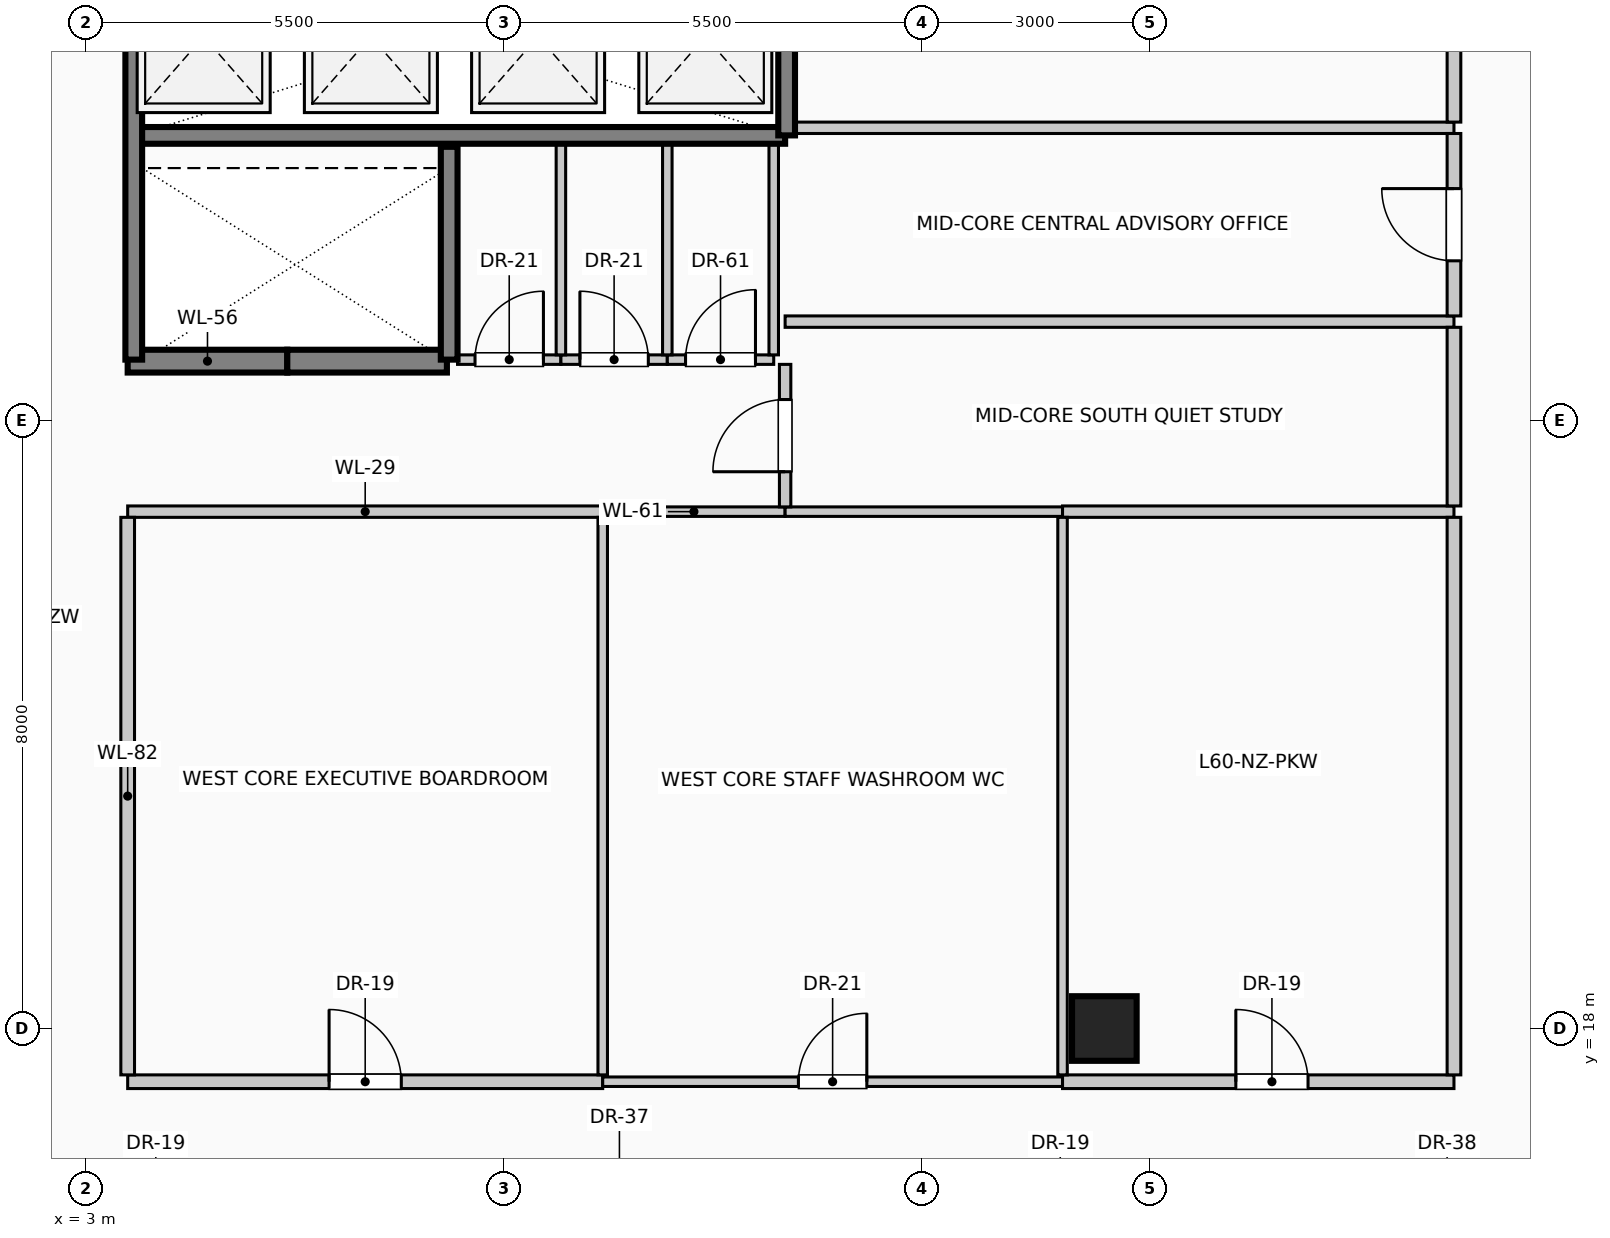
"""IFC4 building model, lengths in metres.
Left out: names, types, materials, properties, quantities, classifications, styles, units other than length and angle.
Written with IfcOpenShell. Run it as: python <this file> out.ifc"""

import sys

from ifc_helpers import new_model, si_unit, direction, frame, frame_2d, origin, origin_2d, place, context, subcontext, project, spatial, rectangle, circle, extrude, element, fill, save


model = new_model("IFC4")
c1 = context("Model", 3, precision=1e-05, world=origin(), true_north=direction((0.0, 1.0)))
c2 = subcontext(c1, "Body", "Model", "MODEL_VIEW")
j1 = project(units=[si_unit("LENGTHUNIT", "METRE"), si_unit("PLANEANGLEUNIT", "RADIAN")], contexts=[c1])
p1 = place(None, origin())
s1 = spatial("IfcSite", under=j1, at=p1, CompositionType="ELEMENT")
p2 = place(p1, origin())
s2 = spatial("IfcBuilding", under=s1, at=p2, CompositionType="ELEMENT")
p3 = place(p2, frame((0.0, 0.0, 248.6)))
s3 = spatial("IfcBuildingStorey", under=s2, at=p3, CompositionType="ELEMENT", Elevation=248.6)
p4 = place(p3, frame((16.4, 18.0, 0.0), z_axis=(0.0, 0.0, 1.0), x_axis=(1.0, 0.0, 0.0)))
e1 = element("IfcColumn", 1, at=p4, inside=s3, PredefinedType="COLUMN", context=c2, shape_type="SweptSolid", body=[
    extrude(circle(Radius=0.425, at=origin_2d()), origin(), (0.0, 0.0, 1.0), 4.0),
])
p5 = place(p3, frame((5.65, 26.78, 0.0), z_axis=(0.0, 0.0, 1.0), x_axis=(-1.0, 0.0, 0.0)))
e2 = element("IfcWall", 2, at=p5, inside=s3, PredefinedType="SOLIDWALL", context=c2, shape_type="SweptSolid", body=[
    extrude(rectangle(XDim=2.1, YDim=0.3, at=frame_2d((1.05, 0.0))), origin(), (0.0, 0.0, 1.0), 4.0),
])
p6 = place(p3, frame((7.75, 26.78, 0.0), z_axis=(0.0, 0.0, 1.0), x_axis=(-1.0, 0.0, 0.0)))
e3 = element("IfcWall", 3, at=p6, inside=s3, PredefinedType="SOLIDWALL", context=c2, shape_type="SweptSolid", body=[
    extrude(rectangle(XDim=2.1, YDim=0.3, at=frame_2d((1.05, 0.0))), origin(), (0.0, 0.0, 1.0), 4.0),
])
p7 = place(p3, frame((3.55, 29.75, 0.0), z_axis=(0.0, 0.0, 1.0), x_axis=(1.0, 0.0, 0.0)))
e4 = element("IfcWall", 4, at=p7, inside=s3, PredefinedType="SOLIDWALL", context=c2, shape_type="SweptSolid", body=[
    extrude(rectangle(XDim=8.65, YDim=0.22, at=frame_2d((4.325, 0.0))), origin(), (0.0, 0.0, 1.0), 4.0),
])
p8 = place(p3, frame((3.63, 26.8, 0.0), z_axis=(0.0, 0.0, 1.0), x_axis=(0.0, 1.0, 0.0)))
e5 = element("IfcWall", 5, at=p8, inside=s3, PredefinedType="SOLIDWALL", context=c2, shape_type="SweptSolid", body=[
    extrude(rectangle(XDim=5.55, YDim=0.22, at=frame_2d((2.775, 0.0))), origin(), (0.0, 0.0, 1.0), 4.0),
])
p9 = place(p3, frame((7.78, 26.8, 0.0), z_axis=(0.0, 0.0, 1.0), x_axis=(0.0, 1.0, 0.0)))
e6 = element("IfcWall", 6, at=p9, inside=s3, PredefinedType="SOLIDWALL", context=c2, shape_type="SweptSolid", body=[
    extrude(rectangle(XDim=2.8, YDim=0.22, at=frame_2d((1.4, 0.0))), origin(), (0.0, 0.0, 1.0), 4.0),
])
p10 = place(p3, frame((12.22, 29.75, 0.0), z_axis=(0.0, 0.0, 1.0), x_axis=(0.0, 1.0, 0.0)))
e7 = element("IfcWall", 7, at=p10, inside=s3, PredefinedType="SOLIDWALL", context=c2, shape_type="SweptSolid", body=[
    extrude(rectangle(XDim=2.6, YDim=0.22, at=frame_2d((1.3, 0.0))), origin(), (0.0, 0.0, 1.0), 4.0),
])
p11 = place(p3, frame((3.55, 17.3, 0.0), z_axis=(0.0, 0.0, 1.0), x_axis=(1.0, 0.0, 0.0)))
e8 = element("IfcWall", 8, at=p11, inside=s3, PredefinedType="PARTITIONING", context=c2, shape_type="SweptSolid", body=[
    extrude(rectangle(XDim=6.25, YDim=0.18, at=frame_2d((3.125, 0.0))), origin(), (0.0, 0.0, 1.0), 3.75),
])
p12 = place(p11, frame((2.65, 0.0, 0.0)))
e9 = element("IfcOpeningElement", 9, at=p12, cuts=e8, PredefinedType="OPENING", context=c2, shape_type="SweptSolid", body=[
    extrude(rectangle(XDim=0.95, YDim=2.15, at=frame_2d((0.475, 1.075))), frame((0.0, 0.1, 0.0), z_axis=(0.0, -1.0, 0.0), x_axis=(1.0, 0.0, 0.0)), (0.0, 0.0, 1.0), 0.2),
])
p13 = place(p3, frame((9.8, 17.3, 0.0), z_axis=(0.0, 0.0, 1.0), x_axis=(1.0, 0.0, 0.0)))
e10 = element("IfcWall", 10, at=p13, inside=s3, PredefinedType="PARTITIONING", context=c2, shape_type="SweptSolid", body=[
    extrude(rectangle(XDim=6.05, YDim=0.125, at=frame_2d((3.025, 0.0))), origin(), (0.0, 0.0, 1.0), 3.75),
])
p14 = place(p13, frame((2.575, 0.0, 0.0)))
e11 = element("IfcOpeningElement", 11, at=p14, cuts=e10, PredefinedType="OPENING", context=c2, shape_type="SweptSolid", body=[
    extrude(rectangle(XDim=0.9, YDim=2.1, at=frame_2d((0.45, 1.05))), frame((0.0, 0.073, 0.0), z_axis=(0.0, -1.0, 0.0), x_axis=(1.0, 0.0, 0.0)), (0.0, 0.0, 1.0), 0.145),
])
p15 = place(p3, frame((15.85, 17.3, 0.0), z_axis=(0.0, 0.0, 1.0), x_axis=(1.0, 0.0, 0.0)))
e12 = element("IfcWall", 12, at=p15, inside=s3, PredefinedType="PARTITIONING", context=c2, shape_type="SweptSolid", body=[
    extrude(rectangle(XDim=5.15, YDim=0.18, at=frame_2d((2.575, 0.0))), origin(), (0.0, 0.0, 1.0), 3.75),
])
p16 = place(p15, frame((2.28, 0.0, 0.0)))
e13 = element("IfcOpeningElement", 13, at=p16, cuts=e12, PredefinedType="OPENING", context=c2, shape_type="SweptSolid", body=[
    extrude(rectangle(XDim=0.95, YDim=2.15, at=frame_2d((0.475, 1.075))), frame((0.0, 0.1, 0.0), z_axis=(0.0, -1.0, 0.0), x_axis=(1.0, 0.0, 0.0)), (0.0, 0.0, 1.0), 0.2),
])
p17 = place(p3, frame((3.55, 24.8, 0.0), z_axis=(0.0, 0.0, 1.0), x_axis=(1.0, 0.0, 0.0)))
e14 = element("IfcWall", 14, at=p17, inside=s3, PredefinedType="PARTITIONING", context=c2, shape_type="SweptSolid", body=[
    extrude(rectangle(XDim=6.25, YDim=0.15, at=frame_2d((3.125, 0.0))), origin(), (0.0, 0.0, 1.0), 3.75),
])
p18 = place(p3, frame((9.8, 24.8, 0.0), z_axis=(0.0, 0.0, 1.0), x_axis=(1.0, 0.0, 0.0)))
e15 = element("IfcWall", 15, at=p18, inside=s3, PredefinedType="PARTITIONING", context=c2, shape_type="SweptSolid", body=[
    extrude(rectangle(XDim=2.4, YDim=0.125, at=frame_2d((1.2, 0.0))), origin(), (0.0, 0.0, 1.0), 3.75),
])
p19 = place(p3, frame((12.2, 24.8, 0.0), z_axis=(0.0, 0.0, 1.0), x_axis=(1.0, 0.0, 0.0)))
e16 = element("IfcWall", 16, at=p19, inside=s3, PredefinedType="PARTITIONING", context=c2, shape_type="SweptSolid", body=[
    extrude(rectangle(XDim=3.65, YDim=0.125, at=frame_2d((1.825, 0.0))), origin(), (0.0, 0.0, 1.0), 3.75),
])
p20 = place(p3, frame((15.85, 24.8, 0.0), z_axis=(0.0, 0.0, 1.0), x_axis=(1.0, 0.0, 0.0)))
e17 = element("IfcWall", 17, at=p20, inside=s3, PredefinedType="PARTITIONING", context=c2, shape_type="SweptSolid", body=[
    extrude(rectangle(XDim=5.15, YDim=0.15, at=frame_2d((2.575, 0.0))), origin(), (0.0, 0.0, 1.0), 3.75),
])
p21 = place(p3, frame((7.89, 26.8, 0.0), z_axis=(0.0, 0.0, 1.0), x_axis=(1.0, 0.0, 0.0)))
e18 = element("IfcWall", 18, at=p21, inside=s3, PredefinedType="PARTITIONING", context=c2, shape_type="SweptSolid", body=[
    extrude(rectangle(XDim=1.36, YDim=0.125, at=frame_2d((0.68, 0.0))), origin(), (0.0, 0.0, 1.0), 3.75),
])
p22 = place(p21, frame((0.23, 0.0, 0.0)))
e19 = element("IfcOpeningElement", 19, at=p22, cuts=e18, PredefinedType="OPENING", context=c2, shape_type="SweptSolid", body=[
    extrude(rectangle(XDim=0.9, YDim=2.1, at=frame_2d((0.45, 1.05))), frame((0.0, 0.073, 0.0), z_axis=(0.0, -1.0, 0.0), x_axis=(1.0, 0.0, 0.0)), (0.0, 0.0, 1.0), 0.145),
])
p23 = place(p3, frame((9.25, 26.8, 0.0), z_axis=(0.0, 0.0, 1.0), x_axis=(1.0, 0.0, 0.0)))
e20 = element("IfcWall", 20, at=p23, inside=s3, PredefinedType="PARTITIONING", context=c2, shape_type="SweptSolid", body=[
    extrude(rectangle(XDim=1.4, YDim=0.125, at=frame_2d((0.7, 0.0))), origin(), (0.0, 0.0, 1.0), 3.75),
])
p24 = place(p23, frame((0.25, 0.0, 0.0)))
e21 = element("IfcOpeningElement", 21, at=p24, cuts=e20, PredefinedType="OPENING", context=c2, shape_type="SweptSolid", body=[
    extrude(rectangle(XDim=0.9, YDim=2.1, at=frame_2d((0.45, 1.05))), frame((0.0, 0.073, 0.0), z_axis=(0.0, -1.0, 0.0), x_axis=(1.0, 0.0, 0.0)), (0.0, 0.0, 1.0), 0.145),
])
p25 = place(p3, frame((10.65, 26.8, 0.0), z_axis=(0.0, 0.0, 1.0), x_axis=(1.0, 0.0, 0.0)))
e22 = element("IfcWall", 22, at=p25, inside=s3, PredefinedType="PARTITIONING", context=c2, shape_type="SweptSolid", body=[
    extrude(rectangle(XDim=1.4, YDim=0.125, at=frame_2d((0.7, 0.0))), origin(), (0.0, 0.0, 1.0), 3.75),
])
p26 = place(p25, frame((0.24, 0.0, 0.0)))
e23 = element("IfcOpeningElement", 23, at=p26, cuts=e22, PredefinedType="OPENING", context=c2, shape_type="SweptSolid", body=[
    extrude(rectangle(XDim=0.92, YDim=2.1, at=frame_2d((0.46, 1.05))), frame((0.0, 0.073, 0.0), z_axis=(0.0, -1.0, 0.0), x_axis=(1.0, 0.0, 0.0)), (0.0, 0.0, 1.0), 0.145),
])
p27 = place(p3, frame((12.2, 27.3, 0.0), z_axis=(0.0, 0.0, 1.0), x_axis=(1.0, 0.0, 0.0)))
e24 = element("IfcWall", 24, at=p27, inside=s3, PredefinedType="PARTITIONING", context=c2, shape_type="SweptSolid", body=[
    extrude(rectangle(XDim=8.8, YDim=0.15, at=frame_2d((4.4, 0.0))), origin(), (0.0, 0.0, 1.0), 3.75),
])
p28 = place(p3, frame((12.33, 29.85, 0.0), z_axis=(0.0, 0.0, 1.0), x_axis=(1.0, 0.0, 0.0)))
e25 = element("IfcWall", 25, at=p28, inside=s3, PredefinedType="PARTITIONING", context=c2, shape_type="SweptSolid", body=[
    extrude(rectangle(XDim=8.67, YDim=0.15, at=frame_2d((4.335, 0.0))), origin(), (0.0, 0.0, 1.0), 3.75),
])
p29 = place(p3, frame((3.55, 17.39, 0.0), z_axis=(0.0, 0.0, 1.0), x_axis=(0.0, 1.0, 0.0)))
e26 = element("IfcWall", 26, at=p29, inside=s3, PredefinedType="PARTITIONING", context=c2, shape_type="SweptSolid", body=[
    extrude(rectangle(XDim=7.335, YDim=0.18, at=frame_2d((3.667, 0.0))), origin(), (0.0, 0.0, 1.0), 3.75),
])
p30 = place(p3, frame((9.25, 26.863, 0.0), z_axis=(0.0, 0.0, 1.0), x_axis=(0.0, 1.0, 0.0)))
e27 = element("IfcWall", 27, at=p30, inside=s3, PredefinedType="PARTITIONING", context=c2, shape_type="SweptSolid", body=[
    extrude(rectangle(XDim=2.777, YDim=0.125, at=frame_2d((1.389, 0.0))), origin(), (0.0, 0.0, 1.0), 3.75),
])
p31 = place(p3, frame((9.8, 17.39, 0.0), z_axis=(0.0, 0.0, 1.0), x_axis=(0.0, 1.0, 0.0)))
e28 = element("IfcWall", 28, at=p31, inside=s3, PredefinedType="PARTITIONING", context=c2, shape_type="SweptSolid", body=[
    extrude(rectangle(XDim=7.335, YDim=0.125, at=frame_2d((3.667, 0.0))), origin(), (0.0, 0.0, 1.0), 3.75),
])
for number, where, z_axis, x_axis in (
    (29, (10.65, 26.863, 0.0), (0.0, 0.0, 1.0), (0.0, 1.0, 0.0)),
    (30, (12.05, 26.863, 0.0), (0.0, 0.0, 1.0), (0.0, 1.0, 0.0)),
):
    element("IfcWall", number, at=place(p3, frame(where, z_axis=z_axis, x_axis=x_axis)), inside=s3, PredefinedType="PARTITIONING", context=c2, shape_type="SweptSolid", body=[
        extrude(rectangle(XDim=2.777, YDim=0.125, at=frame_2d((1.389, 0.0))), origin(), (0.0, 0.0, 1.0), 3.75),
    ])
p32 = place(p3, frame((12.2, 24.863, 0.0), z_axis=(0.0, 0.0, 1.0), x_axis=(0.0, 1.0, 0.0)))
e31 = element("IfcWall", 31, at=p32, inside=s3, PredefinedType="PARTITIONING", context=c2, shape_type="SweptSolid", body=[
    extrude(rectangle(XDim=1.875, YDim=0.15, at=frame_2d((0.938, 0.0))), origin(), (0.0, 0.0, 1.0), 3.75),
])
p33 = place(p32, frame((0.462, 0.0, 0.0)))
e32 = element("IfcOpeningElement", 32, at=p33, cuts=e31, PredefinedType="OPENING", context=c2, shape_type="SweptSolid", body=[
    extrude(rectangle(XDim=0.95, YDim=2.15, at=frame_2d((0.475, 1.075))), frame((0.0, 0.085, 0.0), z_axis=(0.0, -1.0, 0.0), x_axis=(1.0, 0.0, 0.0)), (0.0, 0.0, 1.0), 0.17),
])
p34 = place(p3, frame((15.85, 17.39, 0.0), z_axis=(0.0, 0.0, 1.0), x_axis=(0.0, 1.0, 0.0)))
e33 = element("IfcWall", 33, at=p34, inside=s3, PredefinedType="PARTITIONING", context=c2, shape_type="SweptSolid", body=[
    extrude(rectangle(XDim=7.335, YDim=0.125, at=frame_2d((3.667, 0.0))), origin(), (0.0, 0.0, 1.0), 3.75),
])
p35 = place(p3, frame((21.0, 17.39, 0.0), z_axis=(0.0, 0.0, 1.0), x_axis=(0.0, 1.0, 0.0)))
e34 = element("IfcWall", 34, at=p35, inside=s3, PredefinedType="PARTITIONING", context=c2, shape_type="SweptSolid", body=[
    extrude(rectangle(XDim=7.335, YDim=0.18, at=frame_2d((3.667, 0.0))), origin(), (0.0, 0.0, 1.0), 3.75),
])
p36 = place(p3, frame((21.0, 24.875, 0.0), z_axis=(0.0, 0.0, 1.0), x_axis=(0.0, 1.0, 0.0)))
e35 = element("IfcWall", 35, at=p36, inside=s3, PredefinedType="PARTITIONING", context=c2, shape_type="SweptSolid", body=[
    extrude(rectangle(XDim=2.35, YDim=0.18, at=frame_2d((1.175, 0.0))), origin(), (0.0, 0.0, 1.0), 3.75),
])
p37 = place(p3, frame((21.0, 27.375, 0.0), z_axis=(0.0, 0.0, 1.0), x_axis=(0.0, 1.0, 0.0)))
e36 = element("IfcWall", 36, at=p37, inside=s3, PredefinedType="PARTITIONING", context=c2, shape_type="SweptSolid", body=[
    extrude(rectangle(XDim=2.4, YDim=0.18, at=frame_2d((1.2, 0.0))), origin(), (0.0, 0.0, 1.0), 3.75),
])
p38 = place(p37, frame((0.725, 0.0, 0.0)))
e37 = element("IfcOpeningElement", 37, at=p38, cuts=e36, PredefinedType="OPENING", context=c2, shape_type="SweptSolid", body=[
    extrude(rectangle(XDim=0.95, YDim=2.15, at=frame_2d((0.475, 1.075))), frame((0.0, 0.1, 0.0), z_axis=(0.0, -1.0, 0.0), x_axis=(1.0, 0.0, 0.0)), (0.0, 0.0, 1.0), 0.2),
])
p39 = place(p3, frame((21.0, 29.925, 0.0), z_axis=(0.0, 0.0, 1.0), x_axis=(0.0, 1.0, 0.0)))
e38 = element("IfcWall", 38, at=p39, inside=s3, PredefinedType="PARTITIONING", context=c2, shape_type="SweptSolid", body=[
    extrude(rectangle(XDim=2.335, YDim=0.18, at=frame_2d((1.167, 0.0))), origin(), (0.0, 0.0, 1.0), 3.75),
])
p40 = place(p12, origin())
e39 = element("IfcDoor", 39, at=p40, inside=s3, OperationType="SINGLE_SWING_LEFT", PredefinedType="DOOR", context=c2, shape_type="SweptSolid", body=[
    extrude(rectangle(XDim=0.95, YDim=2.15, at=frame_2d((0.475, 1.075))), frame((0.0, 0.025, 0.0), z_axis=(0.0, -1.0, 0.0), x_axis=(1.0, 0.0, 0.0)), (0.0, 0.0, 1.0), 0.05),
])
fill(e9, e39)
p41 = place(p14, origin())
e40 = element("IfcDoor", 40, at=p41, inside=s3, OperationType="SINGLE_SWING_RIGHT", PredefinedType="DOOR", context=c2, shape_type="SweptSolid", body=[
    extrude(rectangle(XDim=0.9, YDim=2.1, at=frame_2d((0.45, 1.05))), frame((0.0, 0.025, 0.0), z_axis=(0.0, -1.0, 0.0), x_axis=(1.0, 0.0, 0.0)), (0.0, 0.0, 1.0), 0.05),
])
fill(e11, e40)
p42 = place(p16, origin())
e41 = element("IfcDoor", 41, at=p42, inside=s3, OperationType="SINGLE_SWING_LEFT", PredefinedType="DOOR", context=c2, shape_type="SweptSolid", body=[
    extrude(rectangle(XDim=0.95, YDim=2.15, at=frame_2d((0.475, 1.075))), frame((0.0, 0.025, 0.0), z_axis=(0.0, -1.0, 0.0), x_axis=(1.0, 0.0, 0.0)), (0.0, 0.0, 1.0), 0.05),
])
fill(e13, e41)
p43 = place(p22, origin())
e42 = element("IfcDoor", 42, at=p43, inside=s3, OperationType="SINGLE_SWING_RIGHT", PredefinedType="DOOR", context=c2, shape_type="SweptSolid", body=[
    extrude(rectangle(XDim=0.9, YDim=2.1, at=frame_2d((0.45, 1.05))), frame((0.0, 0.025, 0.0), z_axis=(0.0, -1.0, 0.0), x_axis=(1.0, 0.0, 0.0)), (0.0, 0.0, 1.0), 0.05),
])
fill(e19, e42)
p44 = place(p24, origin())
e43 = element("IfcDoor", 43, at=p44, inside=s3, OperationType="SINGLE_SWING_LEFT", PredefinedType="DOOR", context=c2, shape_type="SweptSolid", body=[
    extrude(rectangle(XDim=0.9, YDim=2.1, at=frame_2d((0.45, 1.05))), frame((0.0, 0.025, 0.0), z_axis=(0.0, -1.0, 0.0), x_axis=(1.0, 0.0, 0.0)), (0.0, 0.0, 1.0), 0.05),
])
fill(e21, e43)
p45 = place(p26, origin())
e44 = element("IfcDoor", 44, at=p45, inside=s3, OperationType="SINGLE_SWING_RIGHT", PredefinedType="DOOR", context=c2, shape_type="SweptSolid", body=[
    extrude(rectangle(XDim=0.92, YDim=2.1, at=frame_2d((0.46, 1.05))), frame((0.0, 0.025, 0.0), z_axis=(0.0, -1.0, 0.0), x_axis=(1.0, 0.0, 0.0)), (0.0, 0.0, 1.0), 0.05),
])
fill(e23, e44)
p46 = place(p33, origin())
e45 = element("IfcDoor", 45, at=p46, inside=s3, OperationType="SINGLE_SWING_LEFT", PredefinedType="DOOR", context=c2, shape_type="SweptSolid", body=[
    extrude(rectangle(XDim=0.95, YDim=2.15, at=frame_2d((0.475, 1.075))), frame((0.0, 0.025, 0.0), z_axis=(0.0, -1.0, 0.0), x_axis=(1.0, 0.0, 0.0)), (0.0, 0.0, 1.0), 0.05),
])
fill(e32, e45)
p47 = place(p38, origin())
e46 = element("IfcDoor", 46, at=p47, inside=s3, OperationType="SINGLE_SWING_RIGHT", PredefinedType="DOOR", context=c2, shape_type="SweptSolid", body=[
    extrude(rectangle(XDim=0.95, YDim=2.15, at=frame_2d((0.475, 1.075))), frame((0.0, 0.025, 0.0), z_axis=(0.0, -1.0, 0.0), x_axis=(1.0, 0.0, 0.0)), (0.0, 0.0, 1.0), 0.05),
])
fill(e37, e46)
save(model, sys.argv[1])
